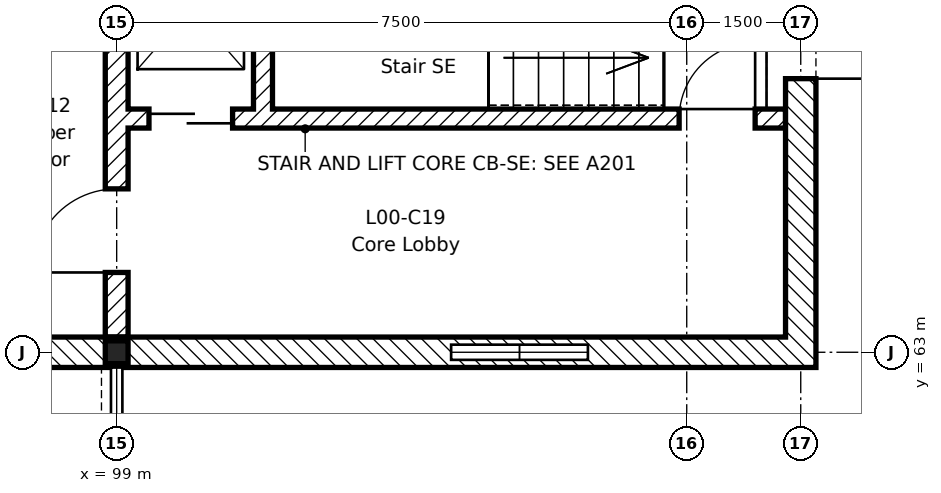
"""IFC4 building model, lengths in metres.
Left out: names, types, materials, properties, quantities, classifications, styles, units other than length and angle.
Written with IfcOpenShell. Run it as: python <this file> out.ifc"""

import sys

from ifc_helpers import new_model, si_unit, direction, frame, frame_2d, origin, origin_2d, place, context, subcontext, project, spatial, rectangle, i_section, extrude, element, fill, save


model = new_model("IFC4")
c1 = context("Model", 3, precision=1e-05, world=origin(), true_north=direction((0.0, 1.0)))
c2 = subcontext(c1, "Body", "Model", "MODEL_VIEW")
j1 = project(units=[si_unit("LENGTHUNIT", "METRE"), si_unit("PLANEANGLEUNIT", "RADIAN")], contexts=[c1])
p1 = place(None, origin())
s1 = spatial("IfcSite", under=j1, at=p1, CompositionType="ELEMENT")
p2 = place(p1, origin())
s2 = spatial("IfcBuilding", under=s1, at=p2, CompositionType="ELEMENT")
p3 = place(p2, origin())
s3 = spatial("IfcBuildingStorey", under=s2, at=p3, CompositionType="ELEMENT", Elevation=0.0)
p4 = place(p3, frame((99.0, 63.0, -0.6), z_axis=(0.0, 0.0, 1.0), x_axis=(1.0, 0.0, 0.0)))
e1 = element("IfcColumn", 1, at=p4, inside=s3, PredefinedType="COLUMN", context=c2, shape_type="SweptSolid", body=[
    extrude(i_section(OverallWidth=0.3, OverallDepth=0.3, WebThickness=0.011, FlangeThickness=0.019, FilletRadius=0.027, at=origin_2d()), origin(), (0.0, 0.0, 1.0), 5.8),
])
p5 = place(p3, frame((99.0, 63.2, 0.0), z_axis=(0.0, 0.0, 1.0), x_axis=(0.0, 1.0, 0.0)))
e2 = element("IfcWall", 2, at=p5, inside=s3, PredefinedType="SHEAR", context=c2, shape_type="SweptSolid", body=[
    extrude(rectangle(XDim=8.95, YDim=0.3, at=frame_2d((4.475, 0.0))), origin(), (0.0, 0.0, 1.0), 5.2),
])
p6 = place(p5, frame((0.85, 0.0, 0.0)))
e3 = element("IfcOpeningElement", 3, at=p6, cuts=e2, PredefinedType="OPENING", context=c2, shape_type="SweptSolid", body=[
    extrude(rectangle(XDim=1.1, YDim=2.1, at=frame_2d((0.55, 1.05))), frame((0.0, 0.16, 0.0), z_axis=(0.0, -1.0, 0.0), x_axis=(1.0, 0.0, 0.0)), (0.0, 0.0, 1.0), 0.32),
])
p7 = place(p3, frame((107.8, 66.075, 0.0), z_axis=(0.0, 0.0, 1.0), x_axis=(-1.0, 0.0, 0.0)))
e4 = element("IfcWall", 4, at=p7, inside=s3, PredefinedType="SHEAR", context=c2, shape_type="SweptSolid", body=[
    extrude(rectangle(XDim=8.65, YDim=0.25, at=frame_2d((4.325, 0.0))), origin(), (0.0, 0.0, 1.0), 5.2),
])
p8 = place(p7, frame((0.4, 0.0, 0.0)))
e5 = element("IfcOpeningElement", 5, at=p8, cuts=e4, PredefinedType="OPENING", context=c2, shape_type="SweptSolid", body=[
    extrude(rectangle(XDim=1.0, YDim=2.1, at=frame_2d((0.5, 1.05))), frame((0.0, 0.135, 0.0), z_axis=(0.0, -1.0, 0.0), x_axis=(1.0, 0.0, 0.0)), (0.0, 0.0, 1.0), 0.27),
])
p9 = place(p7, frame((7.275, 0.0, 0.0)))
e6 = element("IfcOpeningElement", 6, at=p9, cuts=e4, PredefinedType="OPENING", context=c2, shape_type="SweptSolid", body=[
    extrude(rectangle(XDim=1.1, YDim=2.1, at=frame_2d((0.55, 1.05))), frame((0.0, 0.135, 0.0), z_axis=(0.0, -1.0, 0.0), x_axis=(1.0, 0.0, 0.0)), (0.0, 0.0, 1.0), 0.27),
])
p10 = place(p3, frame((100.925, 66.2, 0.0), z_axis=(0.0, 0.0, 1.0), x_axis=(0.0, 1.0, 0.0)))
e7 = element("IfcWall", 7, at=p10, inside=s3, PredefinedType="SHEAR", context=c2, shape_type="SweptSolid", body=[
    extrude(rectangle(XDim=2.85, YDim=0.25, at=frame_2d((1.425, 0.0))), origin(), (0.0, 0.0, 1.0), 5.2),
])
p11 = place(p3, frame((72.0, 63.0, 0.0), z_axis=(0.0, 0.0, 1.0), x_axis=(1.0, 0.0, 0.0)))
e8 = element("IfcWall", 8, at=p11, inside=s3, PredefinedType="STANDARD", context=c2, shape_type="SweptSolid", body=[
    extrude(rectangle(XDim=27.0, YDim=0.4, at=frame_2d((13.5, 0.0))), origin(), (0.0, 0.0, 1.0), 4.71),
])
p12 = place(p11, frame((3.3, 0.0, 0.0)))
e9 = element("IfcOpeningElement", 9, at=p12, cuts=e8, PredefinedType="OPENING", context=c2, shape_type="SweptSolid", body=[
    extrude(rectangle(XDim=2.4, YDim=2.4, at=frame_2d((1.2, 1.2))), frame((0.0, 0.21, 0.0), z_axis=(0.0, -1.0, 0.0), x_axis=(1.0, 0.0, 0.0)), (0.0, 0.0, 1.0), 0.42),
])
p13 = place(p11, frame((12.3, 0.0, 0.0)))
e10 = element("IfcOpeningElement", 10, at=p13, cuts=e8, PredefinedType="OPENING", context=c2, shape_type="SweptSolid", body=[
    extrude(rectangle(XDim=2.4, YDim=2.4, at=frame_2d((1.2, 1.2))), frame((0.0, 0.21, 0.0), z_axis=(0.0, -1.0, 0.0), x_axis=(1.0, 0.0, 0.0)), (0.0, 0.0, 1.0), 0.42),
])
p14 = place(p11, frame((21.3, 0.0, 0.0)))
e11 = element("IfcOpeningElement", 11, at=p14, cuts=e8, PredefinedType="OPENING", context=c2, shape_type="SweptSolid", body=[
    extrude(rectangle(XDim=2.4, YDim=2.4, at=frame_2d((1.2, 1.2))), frame((0.0, 0.21, 0.0), z_axis=(0.0, -1.0, 0.0), x_axis=(1.0, 0.0, 0.0)), (0.0, 0.0, 1.0), 0.42),
])
p15 = place(p3, frame((99.0, 63.0, 0.0), z_axis=(0.0, 0.0, 1.0), x_axis=(1.0, 0.0, 0.0)))
e12 = element("IfcWall", 12, at=p15, inside=s3, PredefinedType="STANDARD", context=c2, shape_type="SweptSolid", body=[
    extrude(rectangle(XDim=4.4, YDim=0.4, at=frame_2d((2.2, 0.0))), origin(), (0.0, 0.0, 1.0), 5.2),
])
p16 = place(p3, frame((105.2, 63.0, 0.0), z_axis=(0.0, 0.0, 1.0), x_axis=(1.0, 0.0, 0.0)))
e13 = element("IfcWall", 13, at=p16, inside=s3, PredefinedType="STANDARD", context=c2, shape_type="SweptSolid", body=[
    extrude(rectangle(XDim=3.0, YDim=0.4, at=frame_2d((1.5, 0.0))), origin(), (0.0, 0.0, 1.0), 5.2),
])
p17 = place(p3, frame((103.4, 63.0, 0.0), z_axis=(0.0, 0.0, 1.0), x_axis=(1.0, 0.0, 0.0)))
e14 = element("IfcWall", 14, at=p17, inside=s3, PredefinedType="STANDARD", context=c2, shape_type="SweptSolid", body=[
    extrude(rectangle(XDim=1.8, YDim=0.4, at=frame_2d((0.9, 0.0))), origin(), (0.0, 0.0, 1.0), 0.9),
])
p18 = place(p3, frame((108.0, 63.2, 0.0), z_axis=(0.0, 0.0, 1.0), x_axis=(0.0, 1.0, 0.0)))
e15 = element("IfcWall", 15, at=p18, inside=s3, PredefinedType="STANDARD", context=c2, shape_type="SweptSolid", body=[
    extrude(rectangle(XDim=8.8, YDim=0.4, at=frame_2d((4.4, 0.0))), origin(), (0.0, 0.0, 1.0), 5.2),
])
p19 = place(p18, frame((3.4, 0.0, 0.0)))
e16 = element("IfcOpeningElement", 16, at=p19, cuts=e15, PredefinedType="OPENING", context=c2, shape_type="SweptSolid", body=[
    extrude(rectangle(XDim=1.8, YDim=2.1, at=frame_2d((0.9, 1.05))), frame((0.0, 0.21, 0.0), z_axis=(0.0, -1.0, 0.0), x_axis=(1.0, 0.0, 0.0)), (0.0, 0.0, 1.0), 0.42),
])
p20 = place(p19, frame((1.8, 0.0, 0.0), z_axis=(0.0, 0.0, 1.0), x_axis=(-1.0, 0.0, 0.0)))
e17 = element("IfcDoor", 17, at=p20, inside=s3, OperationType="DOUBLE_DOOR_SINGLE_SWING", PredefinedType="DOOR", context=c2, shape_type="SweptSolid", body=[
    extrude(rectangle(XDim=1.8, YDim=2.1, at=frame_2d((0.9, 1.05))), frame((0.0, 0.025, 0.0), z_axis=(0.0, -1.0, 0.0), x_axis=(1.0, 0.0, 0.0)), (0.0, 0.0, 1.0), 0.05),
])
fill(e16, e17)
p21 = place(p8, frame((1.0, 0.0, 0.0), z_axis=(0.0, 0.0, 1.0), x_axis=(-1.0, 0.0, 0.0)))
e18 = element("IfcDoor", 18, at=p21, inside=s3, OperationType="SINGLE_SWING_RIGHT", PredefinedType="DOOR", context=c2, shape_type="SweptSolid", body=[
    extrude(rectangle(XDim=1.0, YDim=2.1, at=frame_2d((0.5, 1.05))), frame((0.0, 0.025, 0.0), z_axis=(0.0, -1.0, 0.0), x_axis=(1.0, 0.0, 0.0)), (0.0, 0.0, 1.0), 0.05),
])
fill(e5, e18)
p22 = place(p6, origin())
e19 = element("IfcDoor", 19, at=p22, inside=s3, OperationType="SINGLE_SWING_LEFT", PredefinedType="DOOR", context=c2, shape_type="SweptSolid", body=[
    extrude(rectangle(XDim=1.1, YDim=2.1, at=frame_2d((0.55, 1.05))), frame((0.0, 0.025, 0.0), z_axis=(0.0, -1.0, 0.0), x_axis=(1.0, 0.0, 0.0)), (0.0, 0.0, 1.0), 0.05),
])
fill(e3, e19)
p23 = place(p9, origin())
e20 = element("IfcDoor", 20, at=p23, inside=s3, OperationType="SLIDING_TO_LEFT", PredefinedType="DOOR", context=c2, shape_type="SweptSolid", body=[
    extrude(rectangle(XDim=1.1, YDim=2.1, at=frame_2d((0.55, 1.05))), frame((0.0, 0.025, 0.0), z_axis=(0.0, -1.0, 0.0), x_axis=(1.0, 0.0, 0.0)), (0.0, 0.0, 1.0), 0.05),
])
fill(e6, e20)
save(model, sys.argv[1])
